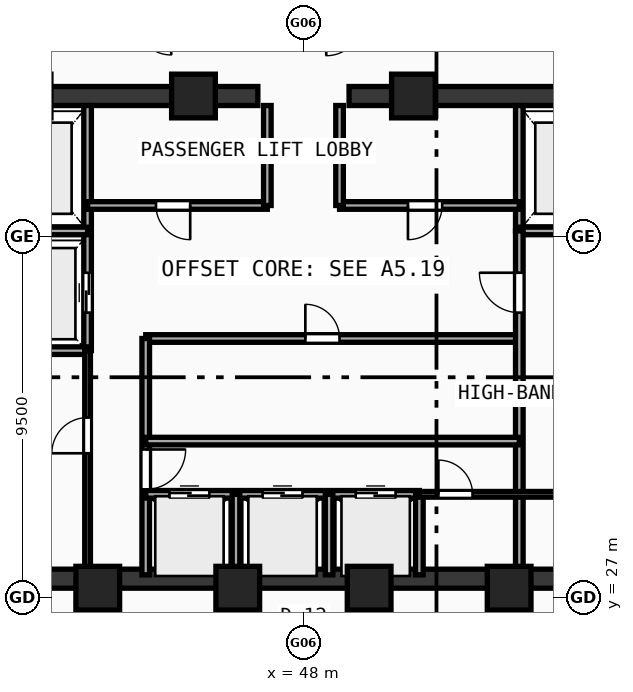
"""IFC4 building model, lengths in metres.
Left out: names, types, materials, properties, quantities, classifications, styles, units other than length and angle.
Written with IfcOpenShell. Run it as: python <this file> out.ifc"""

import sys

from ifc_helpers import new_model, si_unit, direction, frame, frame_2d, origin, origin_with_axes, origin_2d, place, context, subcontext, project, spatial, rectangle, hollow_rectangle, extrude, source, transform, mapped, element, fill, save


model = new_model("IFC4")
c1 = context("Model", 3, precision=1e-05, world=origin(), true_north=direction((0.0, 1.0)))
c2 = subcontext(c1, "Body", "Model", "MODEL_VIEW")
j1 = project(units=[si_unit("LENGTHUNIT", "METRE"), si_unit("PLANEANGLEUNIT", "RADIAN")], contexts=[c1])
p1 = place(None, origin())
s1 = spatial("IfcSite", under=j1, at=p1, CompositionType="ELEMENT")
p2 = place(p1, origin())
s2 = spatial("IfcBuilding", under=s1, at=p2, CompositionType="ELEMENT")
p3 = place(p2, frame((0.0, 0.0, 307.4)))
s3 = spatial("IfcBuildingStorey", under=s2, at=p3, CompositionType="ELEMENT", Elevation=307.4)
p4 = place(p3, frame((35.55, 27.5, 0.0), z_axis=(0.0, 0.0, 1.0), x_axis=(1.0, 0.0, 0.0)))
e1 = element("IfcWall", 1, at=p4, inside=s3, PredefinedType="SHEAR", context=c2, shape_type="SweptSolid", body=[
    extrude(rectangle(XDim=24.9, YDim=0.5, at=frame_2d((12.45, 0.0))), origin(), (0.0, 0.0, 1.0), 3.47),
])
p5 = place(p3, frame((35.55, 40.2, 0.0), z_axis=(0.0, 0.0, 1.0), x_axis=(1.0, 0.0, 0.0)))
e2 = element("IfcWall", 2, at=p5, inside=s3, PredefinedType="SHEAR", context=c2, shape_type="SweptSolid", body=[
    extrude(rectangle(XDim=11.25, YDim=0.5, at=frame_2d((5.625, 0.0))), origin(), (0.0, 0.0, 1.0), 3.47),
])
p6 = place(p5, frame((1.6, 0.0, 0.0)))
e3 = element("IfcOpeningElement", 3, at=p6, cuts=e2, PredefinedType="OPENING", context=c2, shape_type="SweptSolid", body=[
    extrude(rectangle(XDim=1.05, YDim=2.1, at=frame_2d((0.525, 1.05))), frame((0.0, 0.26, 0.0), z_axis=(0.0, -1.0, 0.0), x_axis=(1.0, 0.0, 0.0)), (0.0, 0.0, 1.0), 0.52),
])
p7 = place(p3, frame((49.2, 40.2, 0.0), z_axis=(0.0, 0.0, 1.0), x_axis=(1.0, 0.0, 0.0)))
e4 = element("IfcWall", 4, at=p7, inside=s3, PredefinedType="SHEAR", context=c2, shape_type="SweptSolid", body=[
    extrude(rectangle(XDim=11.25, YDim=0.5, at=frame_2d((5.625, 0.0))), origin(), (0.0, 0.0, 1.0), 3.47),
])
p8 = place(p7, frame((8.6, 0.0, 0.0)))
e5 = element("IfcOpeningElement", 5, at=p8, cuts=e4, PredefinedType="OPENING", context=c2, shape_type="SweptSolid", body=[
    extrude(rectangle(XDim=1.05, YDim=2.1, at=frame_2d((0.525, 1.05))), frame((0.0, 0.26, 0.0), z_axis=(0.0, -1.0, 0.0), x_axis=(1.0, 0.0, 0.0)), (0.0, 0.0, 1.0), 0.52),
])
m1 = source(origin(), c2, "Body", "SweptSolid", [
    extrude(hollow_rectangle(XDim=1.15, YDim=1.15, WallThickness=0.048, at=origin_2d()), origin(), (0.0, 0.0, 1.0), 3.73),
])
for number, where, z_axis, x_axis in (
    (6, (42.588, 27.25, -0.26), (0.0, 0.0, 1.0), (1.0, 0.0, 0.0)),
    (7, (46.272, 27.25, -0.26), (0.0, 0.0, 1.0), (1.0, 0.0, 0.0)),
    (8, (49.729, 27.25, -0.26), (0.0, 0.0, 1.0), (1.0, 0.0, 0.0)),
    (9, (53.412, 27.25, -0.26), (0.0, 0.0, 1.0), (1.0, 0.0, 0.0)),
    (10, (50.894, 40.2, -0.26), (0.0, 0.0, 1.0), (1.0, 0.0, 0.0)),
    (11, (45.106, 40.2, -0.26), (0.0, 0.0, 1.0), (1.0, 0.0, 0.0)),
):
    element("IfcColumn", number, at=place(p3, frame(where, z_axis=z_axis, x_axis=x_axis)), inside=s3, PredefinedType="COLUMN", context=c2, shape_type="MappedRepresentation", body=[
        mapped(m1, transform((0.0, 0.0, 0.0), scale=1.0)),
    ])
p9 = place(p3, frame((42.32, 33.5, 0.0), z_axis=(0.0, 0.0, 1.0), x_axis=(0.0, 1.0, 0.0)))
e12 = element("IfcWall", 12, at=p9, inside=s3, PredefinedType="SOLIDWALL", context=c2, shape_type="SweptSolid", body=[
    extrude(rectangle(XDim=6.45, YDim=0.2, at=frame_2d((3.225, 0.0))), origin(), (0.0, 0.0, 1.0), 3.47),
])
p10 = place(p9, frame((1.0, 0.0, 0.0)))
e13 = element("IfcOpeningElement", 13, at=p10, cuts=e12, PredefinedType="OPENING", context=c2, shape_type="SweptSolid", body=[
    extrude(rectangle(XDim=1.05, YDim=2.1, at=frame_2d((0.525, 1.05))), frame((0.0, 0.11, 0.0), z_axis=(0.0, -1.0, 0.0), x_axis=(1.0, 0.0, 0.0)), (0.0, 0.0, 1.0), 0.22),
])
for number, where, z_axis, x_axis in (
    (14, (39.6, 36.65, 0.0), (0.0, 0.0, 1.0), (1.0, 0.0, 0.0)),
    (15, (39.6, 33.5, 0.0), (0.0, 0.0, 1.0), (1.0, 0.0, 0.0)),
):
    element("IfcWall", number, at=place(p3, frame(where, z_axis=z_axis, x_axis=x_axis)), inside=s3, PredefinedType="SOLIDWALL", context=c2, shape_type="SweptSolid", body=[
        extrude(rectangle(XDim=2.72, YDim=0.2, at=frame_2d((1.36, 0.0))), origin(), (0.0, 0.0, 1.0), 3.47),
    ])
p11 = place(p3, frame((53.68, 36.65, 0.0), z_axis=(0.0, 0.0, 1.0), x_axis=(0.0, 1.0, 0.0)))
e16 = element("IfcWall", 16, at=p11, inside=s3, PredefinedType="SOLIDWALL", context=c2, shape_type="SweptSolid", body=[
    extrude(rectangle(XDim=3.3, YDim=0.2, at=frame_2d((1.65, 0.0))), origin(), (0.0, 0.0, 1.0), 3.47),
])
p12 = place(p3, frame((53.68, 36.65, 0.0), z_axis=(0.0, 0.0, 1.0), x_axis=(1.0, 0.0, 0.0)))
e17 = element("IfcWall", 17, at=p12, inside=s3, PredefinedType="SOLIDWALL", context=c2, shape_type="SweptSolid", body=[
    extrude(rectangle(XDim=2.72, YDim=0.2, at=frame_2d((1.36, 0.0))), origin(), (0.0, 0.0, 1.0), 3.47),
])
p13 = place(p3, frame((42.32, 37.32, 0.0), z_axis=(0.0, 0.0, 1.0), x_axis=(1.0, 0.0, 0.0)))
e18 = element("IfcWall", 18, at=p13, inside=s3, PredefinedType="SOLIDWALL", context=c2, shape_type="SweptSolid", body=[
    extrude(rectangle(XDim=4.73, YDim=0.2, at=frame_2d((2.365, 0.0))), origin(), (0.0, 0.0, 1.0), 3.47),
])
p14 = place(p13, frame((1.8, 0.0, 0.0)))
e19 = element("IfcOpeningElement", 19, at=p14, cuts=e18, PredefinedType="OPENING", context=c2, shape_type="SweptSolid", body=[
    extrude(rectangle(XDim=0.9, YDim=2.1, at=frame_2d((0.45, 1.05))), frame((0.0, 0.11, 0.0), z_axis=(0.0, -1.0, 0.0), x_axis=(1.0, 0.0, 0.0)), (0.0, 0.0, 1.0), 0.22),
])
p15 = place(p3, frame((48.95, 37.32, 0.0), z_axis=(0.0, 0.0, 1.0), x_axis=(1.0, 0.0, 0.0)))
e20 = element("IfcWall", 20, at=p15, inside=s3, PredefinedType="SOLIDWALL", context=c2, shape_type="SweptSolid", body=[
    extrude(rectangle(XDim=4.73, YDim=0.2, at=frame_2d((2.365, 0.0))), origin(), (0.0, 0.0, 1.0), 3.47),
])
p16 = place(p15, frame((1.8, 0.0, 0.0)))
e21 = element("IfcOpeningElement", 21, at=p16, cuts=e20, PredefinedType="OPENING", context=c2, shape_type="SweptSolid", body=[
    extrude(rectangle(XDim=0.9, YDim=2.1, at=frame_2d((0.45, 1.05))), frame((0.0, 0.11, 0.0), z_axis=(0.0, -1.0, 0.0), x_axis=(1.0, 0.0, 0.0)), (0.0, 0.0, 1.0), 0.22),
])
for number, where, z_axis, x_axis in (
    (22, (47.05, 37.32, 0.0), (0.0, 0.0, 1.0), (0.0, 1.0, 0.0)),
    (23, (48.95, 37.32, 0.0), (0.0, 0.0, 1.0), (0.0, 1.0, 0.0)),
):
    element("IfcWall", number, at=place(p3, frame(where, z_axis=z_axis, x_axis=x_axis)), inside=s3, PredefinedType="SOLIDWALL", context=c2, shape_type="SweptSolid", body=[
        extrude(rectangle(XDim=2.63, YDim=0.2, at=frame_2d((1.315, 0.0))), origin(), (0.0, 0.0, 1.0), 3.47),
    ])
p17 = place(p3, frame((43.85, 33.82, 0.0), z_axis=(0.0, 0.0, 1.0), x_axis=(1.0, 0.0, 0.0)))
e24 = element("IfcWall", 24, at=p17, inside=s3, PredefinedType="SOLIDWALL", context=c2, shape_type="SweptSolid", body=[
    extrude(rectangle(XDim=9.83, YDim=0.2, at=frame_2d((4.915, 0.0))), origin(), (0.0, 0.0, 1.0), 3.47),
])
p18 = place(p17, frame((4.2, 0.0, 0.0)))
e25 = element("IfcOpeningElement", 25, at=p18, cuts=e24, PredefinedType="OPENING", context=c2, shape_type="SweptSolid", body=[
    extrude(rectangle(XDim=0.9, YDim=2.1, at=frame_2d((0.45, 1.05))), frame((0.0, 0.11, 0.0), z_axis=(0.0, -1.0, 0.0), x_axis=(1.0, 0.0, 0.0)), (0.0, 0.0, 1.0), 0.22),
])
p19 = place(p3, frame((43.85, 27.6, 0.0), z_axis=(0.0, 0.0, 1.0), x_axis=(0.0, 1.0, 0.0)))
e26 = element("IfcWall", 26, at=p19, inside=s3, PredefinedType="SOLIDWALL", context=c2, shape_type="SweptSolid", body=[
    extrude(rectangle(XDim=6.22, YDim=0.2, at=frame_2d((3.11, 0.0))), origin(), (0.0, 0.0, 1.0), 3.47),
])
p20 = place(p19, frame((2.25, 0.0, 0.0)))
e27 = element("IfcOpeningElement", 27, at=p20, cuts=e26, PredefinedType="OPENING", context=c2, shape_type="SweptSolid", body=[
    extrude(rectangle(XDim=1.05, YDim=2.1, at=frame_2d((0.525, 1.05))), frame((0.0, 0.11, 0.0), z_axis=(0.0, -1.0, 0.0), x_axis=(1.0, 0.0, 0.0)), (0.0, 0.0, 1.0), 0.22),
])
p21 = place(p3, frame((53.68, 27.6, 0.0), z_axis=(0.0, 0.0, 1.0), x_axis=(0.0, 1.0, 0.0)))
e28 = element("IfcWall", 28, at=p21, inside=s3, PredefinedType="SOLIDWALL", context=c2, shape_type="SweptSolid", body=[
    extrude(rectangle(XDim=9.05, YDim=0.2, at=frame_2d((4.525, 0.0))), origin(), (0.0, 0.0, 1.0), 3.47),
])
p22 = place(p21, frame((6.9, 0.0, 0.0)))
e29 = element("IfcOpeningElement", 29, at=p22, cuts=e28, PredefinedType="OPENING", context=c2, shape_type="SweptSolid", body=[
    extrude(rectangle(XDim=1.05, YDim=2.1, at=frame_2d((0.525, 1.05))), frame((0.0, 0.11, 0.0), z_axis=(0.0, -1.0, 0.0), x_axis=(1.0, 0.0, 0.0)), (0.0, 0.0, 1.0), 0.22),
])
p23 = place(p3, frame((43.85, 29.72, 0.0), z_axis=(0.0, 0.0, 1.0), x_axis=(1.0, 0.0, 0.0)))
e30 = element("IfcWall", 30, at=p23, inside=s3, PredefinedType="SOLIDWALL", context=c2, shape_type="SweptSolid", body=[
    extrude(rectangle(XDim=7.2, YDim=0.2, at=frame_2d((3.6, 0.0))), origin(), (0.0, 0.0, 1.0), 3.47),
])
p24 = place(p23, frame((0.625, 0.0, 0.0)))
e31 = element("IfcOpeningElement", 31, at=p24, cuts=e30, PredefinedType="OPENING", context=c2, shape_type="SweptSolid", body=[
    extrude(rectangle(XDim=1.05, YDim=2.1, at=frame_2d((0.525, 1.05))), frame((0.0, 0.11, 0.0), z_axis=(0.0, -1.0, 0.0), x_axis=(1.0, 0.0, 0.0)), (0.0, 0.0, 1.0), 0.22),
])
p25 = place(p23, frame((3.075, 0.0, 0.0)))
e32 = element("IfcOpeningElement", 32, at=p25, cuts=e30, PredefinedType="OPENING", context=c2, shape_type="SweptSolid", body=[
    extrude(rectangle(XDim=1.05, YDim=2.1, at=frame_2d((0.525, 1.05))), frame((0.0, 0.11, 0.0), z_axis=(0.0, -1.0, 0.0), x_axis=(1.0, 0.0, 0.0)), (0.0, 0.0, 1.0), 0.22),
])
p26 = place(p23, frame((5.525, 0.0, 0.0)))
e33 = element("IfcOpeningElement", 33, at=p26, cuts=e30, PredefinedType="OPENING", context=c2, shape_type="SweptSolid", body=[
    extrude(rectangle(XDim=1.05, YDim=2.1, at=frame_2d((0.525, 1.05))), frame((0.0, 0.11, 0.0), z_axis=(0.0, -1.0, 0.0), x_axis=(1.0, 0.0, 0.0)), (0.0, 0.0, 1.0), 0.22),
])
p27 = place(p3, frame((51.05, 27.6, 0.0), z_axis=(0.0, 0.0, 1.0), x_axis=(0.0, 1.0, 0.0)))
e34 = element("IfcWall", 34, at=p27, inside=s3, PredefinedType="SOLIDWALL", context=c2, shape_type="SweptSolid", body=[
    extrude(rectangle(XDim=2.12, YDim=0.2, at=frame_2d((1.06, 0.0))), origin(), (0.0, 0.0, 1.0), 3.47),
])
p28 = place(p3, frame((43.85, 31.12, 0.0), z_axis=(0.0, 0.0, 1.0), x_axis=(1.0, 0.0, 0.0)))
e35 = element("IfcWall", 35, at=p28, inside=s3, PredefinedType="SOLIDWALL", context=c2, shape_type="SweptSolid", body=[
    extrude(rectangle(XDim=9.83, YDim=0.2, at=frame_2d((4.915, 0.0))), origin(), (0.0, 0.0, 1.0), 3.47),
])
for number, where, z_axis, x_axis in (
    (36, (46.225, 27.6, 0.0), (0.0, 0.0, 1.0), (0.0, 1.0, 0.0)),
    (37, (48.675, 27.6, 0.0), (0.0, 0.0, 1.0), (0.0, 1.0, 0.0)),
):
    element("IfcWall", number, at=place(p3, frame(where, z_axis=z_axis, x_axis=x_axis)), inside=s3, PredefinedType="SOLIDWALL", context=c2, shape_type="SweptSolid", body=[
        extrude(rectangle(XDim=2.12, YDim=0.2, at=frame_2d((1.06, 0.0))), origin(), (0.0, 0.0, 1.0), 3.47),
    ])
p29 = place(p3, frame((42.32, 27.6, 0.0), z_axis=(0.0, 0.0, 1.0), x_axis=(0.0, 1.0, 0.0)))
e38 = element("IfcWall", 38, at=p29, inside=s3, PredefinedType="PARTITIONING", context=c2, shape_type="SweptSolid", body=[
    extrude(rectangle(XDim=5.9, YDim=0.15, at=frame_2d((2.95, 0.0))), origin(), (0.0, 0.0, 1.0), 3.47),
])
p30 = place(p29, frame((3.2, 0.0, 0.0)))
e39 = element("IfcOpeningElement", 39, at=p30, cuts=e38, PredefinedType="OPENING", context=c2, shape_type="SweptSolid", body=[
    extrude(rectangle(XDim=0.94, YDim=2.1, at=frame_2d((0.47, 1.05))), frame((0.0, 0.085, 0.0), z_axis=(0.0, -1.0, 0.0), x_axis=(1.0, 0.0, 0.0)), (0.0, 0.0, 1.0), 0.17),
])
p31 = place(p3, frame((51.05, 29.72, 0.0), z_axis=(0.0, 0.0, 1.0), x_axis=(1.0, 0.0, 0.0)))
e40 = element("IfcWall", 40, at=p31, inside=s3, PredefinedType="PARTITIONING", context=c2, shape_type="SweptSolid", body=[
    extrude(rectangle(XDim=4.07, YDim=0.15, at=frame_2d((2.035, 0.0))), origin(), (0.0, 0.0, 1.0), 3.47),
])
p32 = place(p31, frame((0.5, 0.0, 0.0)))
e41 = element("IfcOpeningElement", 41, at=p32, cuts=e40, PredefinedType="OPENING", context=c2, shape_type="SweptSolid", body=[
    extrude(rectangle(XDim=0.9, YDim=2.1, at=frame_2d((0.45, 1.05))), frame((0.0, 0.085, 0.0), z_axis=(0.0, -1.0, 0.0), x_axis=(1.0, 0.0, 0.0)), (0.0, 0.0, 1.0), 0.17),
])
m2 = source(origin(), c2, "Body", "SweptSolid", [
    extrude(rectangle(XDim=1.05, YDim=2.1, at=frame_2d((0.525, 1.05))), frame((0.0, 0.025, 0.0), z_axis=(0.0, -1.0, 0.0), x_axis=(1.0, 0.0, 0.0)), (0.0, 0.0, 1.0), 0.05),
])
p33 = place(p10, origin_with_axes())
e42 = element("IfcDoor", 42, at=p33, inside=s3, OperationType="DOUBLE_DOOR_SLIDING", PredefinedType="DOOR", context=c2, shape_type="MappedRepresentation", body=[
    mapped(m2, transform((0.0, 0.0, 0.0), scale=1.0)),
])
fill(e13, e42)
m3 = source(origin(), c2, "Body", "SweptSolid", [
    extrude(rectangle(XDim=0.9, YDim=2.1, at=frame_2d((0.45, 1.05))), frame((0.0, 0.025, 0.0), z_axis=(0.0, -1.0, 0.0), x_axis=(1.0, 0.0, 0.0)), (0.0, 0.0, 1.0), 0.05),
])
p34 = place(p14, frame((0.9, 0.0, 0.0), z_axis=(0.0, 0.0, 1.0), x_axis=(-1.0, 0.0, 0.0)))
e43 = element("IfcDoor", 43, at=p34, inside=s3, OperationType="SINGLE_SWING_LEFT", PredefinedType="DOOR", context=c2, shape_type="MappedRepresentation", body=[
    mapped(m3, transform((0.0, 0.0, 0.0), scale=1.0)),
])
fill(e19, e43)
p35 = place(p16, frame((0.9, 0.0, 0.0), z_axis=(0.0, 0.0, 1.0), x_axis=(-1.0, 0.0, 0.0)))
e44 = element("IfcDoor", 44, at=p35, inside=s3, OperationType="SINGLE_SWING_RIGHT", PredefinedType="DOOR", context=c2, shape_type="MappedRepresentation", body=[
    mapped(m3, transform((0.0, 0.0, 0.0), scale=1.0)),
])
fill(e21, e44)
p36 = place(p18, origin_with_axes())
e45 = element("IfcDoor", 45, at=p36, inside=s3, OperationType="SINGLE_SWING_LEFT", PredefinedType="DOOR", context=c2, shape_type="MappedRepresentation", body=[
    mapped(m3, transform((0.0, 0.0, 0.0), scale=1.0)),
])
fill(e25, e45)
p37 = place(p20, frame((1.05, 0.0, 0.0), z_axis=(0.0, 0.0, 1.0), x_axis=(-1.0, 0.0, 0.0)))
e46 = element("IfcDoor", 46, at=p37, inside=s3, OperationType="SINGLE_SWING_LEFT", PredefinedType="DOOR", context=c2, shape_type="MappedRepresentation", body=[
    mapped(m2, transform((0.0, 0.0, 0.0), scale=1.0)),
])
fill(e27, e46)
p38 = place(p22, origin_with_axes())
e47 = element("IfcDoor", 47, at=p38, inside=s3, OperationType="SINGLE_SWING_RIGHT", PredefinedType="DOOR", context=c2, shape_type="MappedRepresentation", body=[
    mapped(m2, transform((0.0, 0.0, 0.0), scale=1.0)),
])
fill(e29, e47)
p39 = place(p24, origin_with_axes())
e48 = element("IfcDoor", 48, at=p39, inside=s3, OperationType="DOUBLE_DOOR_SLIDING", PredefinedType="DOOR", context=c2, shape_type="MappedRepresentation", body=[
    mapped(m2, transform((0.0, 0.0, 0.0), scale=1.0)),
])
fill(e31, e48)
p40 = place(p25, origin_with_axes())
e49 = element("IfcDoor", 49, at=p40, inside=s3, OperationType="DOUBLE_DOOR_SLIDING", PredefinedType="DOOR", context=c2, shape_type="MappedRepresentation", body=[
    mapped(m2, transform((0.0, 0.0, 0.0), scale=1.0)),
])
fill(e32, e49)
p41 = place(p26, origin_with_axes())
e50 = element("IfcDoor", 50, at=p41, inside=s3, OperationType="DOUBLE_DOOR_SLIDING", PredefinedType="DOOR", context=c2, shape_type="MappedRepresentation", body=[
    mapped(m2, transform((0.0, 0.0, 0.0), scale=1.0)),
])
fill(e33, e50)
m4 = source(origin(), c2, "Body", "SweptSolid", [
    extrude(rectangle(XDim=0.94, YDim=2.1, at=frame_2d((0.47, 1.05))), frame((0.0, 0.025, 0.0), z_axis=(0.0, -1.0, 0.0), x_axis=(1.0, 0.0, 0.0)), (0.0, 0.0, 1.0), 0.05),
])
p42 = place(p30, origin_with_axes())
e51 = element("IfcDoor", 51, at=p42, inside=s3, OperationType="SINGLE_SWING_LEFT", PredefinedType="DOOR", context=c2, shape_type="MappedRepresentation", body=[
    mapped(m4, transform((0.0, 0.0, 0.0), scale=1.0)),
])
fill(e39, e51)
p43 = place(p32, origin_with_axes())
e52 = element("IfcDoor", 52, at=p43, inside=s3, OperationType="SINGLE_SWING_LEFT", PredefinedType="DOOR", context=c2, shape_type="MappedRepresentation", body=[
    mapped(m3, transform((0.0, 0.0, 0.0), scale=1.0)),
])
fill(e41, e52)
save(model, sys.argv[1])
